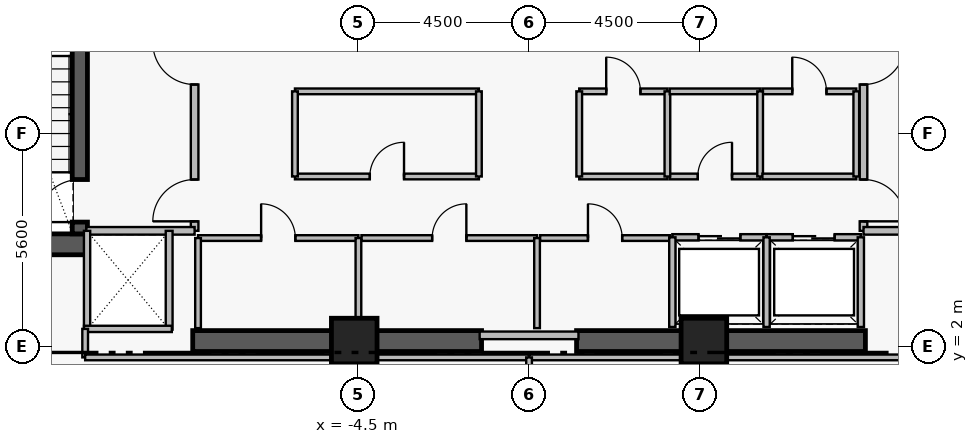
"""IFC4 building model, lengths in metres.
Left out: names, types, materials, properties, quantities, classifications, styles, units other than length and angle.
Written with IfcOpenShell. Run it as: python <this file> out.ifc"""

import sys

from ifc_helpers import new_model, si_unit, direction, frame, frame_2d, origin, origin_2d, place, context, subcontext, project, spatial, rectangle, extrude, element, fill, save


model = new_model("IFC4")
c1 = context("Model", 3, precision=1e-05, world=origin(), true_north=direction((0.0, 1.0)))
c2 = subcontext(c1, "Body", "Model", "MODEL_VIEW")
j1 = project(units=[si_unit("LENGTHUNIT", "METRE"), si_unit("PLANEANGLEUNIT", "RADIAN")], contexts=[c1])
p1 = place(None, origin())
s1 = spatial("IfcSite", under=j1, at=p1, CompositionType="ELEMENT")
p2 = place(p1, origin())
s2 = spatial("IfcBuilding", under=s1, at=p2, CompositionType="ELEMENT")
p3 = place(p2, frame((0.0, 0.0, 254.45)))
s3 = spatial("IfcBuildingStorey", under=s2, at=p3, CompositionType="ELEMENT", Elevation=254.45)
p4 = place(p3, frame((-15.96, 4.695, 0.0), z_axis=(0.0, 0.0, 1.0), x_axis=(1.0, 0.0, 0.0)))
e1 = element("IfcWall", 1, at=p4, inside=s3, PredefinedType="SHEAR", context=c2, shape_type="SweptSolid", body=[
    extrude(rectangle(XDim=4.36, YDim=0.55, at=frame_2d((2.18, 0.0))), origin(), (0.0, 0.0, 1.0), 3.51),
])
for number, where, z_axis, x_axis in (
    (2, (-8.85, 2.15, 0.0), (0.0, 0.0, 1.0), (1.0, 0.0, 0.0)),
    (3, (1.25, 2.15, 0.0), (0.0, 0.0, 1.0), (1.0, 0.0, 0.0)),
):
    element("IfcWall", number, at=place(p3, frame(where, z_axis=z_axis, x_axis=x_axis)), inside=s3, PredefinedType="SHEAR", context=c2, shape_type="SweptSolid", body=[
        extrude(rectangle(XDim=7.6, YDim=0.55, at=frame_2d((3.8, 0.0))), origin(), (0.0, 0.0, 1.0), 3.48),
    ])
p5 = place(p3, frame((-11.82, 4.97, 0.0), z_axis=(0.0, 0.0, 1.0), x_axis=(0.0, 1.0, 0.0)))
e4 = element("IfcWall", 4, at=p5, inside=s3, PredefinedType="SHEAR", context=c2, shape_type="SweptSolid", body=[
    extrude(rectangle(XDim=8.96, YDim=0.4, at=frame_2d((4.48, 0.0))), origin(), (0.0, 0.0, 1.0), 3.51),
])
p6 = place(p5, frame((0.31, 0.0, 0.0)))
e5 = element("IfcOpeningElement", 5, at=p6, cuts=e4, PredefinedType="OPENING", context=c2, shape_type="SweptSolid", body=[
    extrude(rectangle(XDim=1.12, YDim=2.22, at=frame_2d((0.56, 1.11))), frame((0.0, 0.21, 0.0), z_axis=(0.0, -1.0, 0.0), x_axis=(1.0, 0.0, 0.0)), (0.0, 0.0, 1.0), 0.42),
])
for number, where, z_axis, x_axis in (
    (6, (-4.6, 2.15, 0.0), (0.0, 0.0, 1.0), (1.0, 0.0, 0.0)),
    (7, (4.6, 2.15, 0.0), (0.0, 0.0, 1.0), (1.0, 0.0, 0.0)),
):
    element("IfcColumn", number, at=place(p3, frame(where, z_axis=z_axis, x_axis=x_axis)), inside=s3, PredefinedType="COLUMN", context=c2, shape_type="SweptSolid", body=[
        extrude(rectangle(XDim=1.2, YDim=1.2, at=origin_2d()), origin(), (0.0, 0.0, 1.0), 3.7),
    ])
p7 = place(p3, frame((-8.8, 5.05, 0.0), z_axis=(0.0, 0.0, 1.0), x_axis=(0.0, 1.0, 0.0)))
e8 = element("IfcWall", 8, at=p7, inside=s3, PredefinedType="PARTITIONING", context=c2, shape_type="SweptSolid", body=[
    extrude(rectangle(XDim=6.1, YDim=0.2, at=frame_2d((3.05, 0.0))), origin(), (0.0, 0.0, 1.0), 3.48),
])
p8 = place(p7, frame((0.25, 0.0, 0.0)))
e9 = element("IfcOpeningElement", 9, at=p8, cuts=e8, PredefinedType="OPENING", context=c2, shape_type="SweptSolid", body=[
    extrude(rectangle(XDim=1.1, YDim=2.2, at=frame_2d((0.55, 1.1))), frame((0.0, 0.11, 0.0), z_axis=(0.0, -1.0, 0.0), x_axis=(1.0, 0.0, 0.0)), (0.0, 0.0, 1.0), 0.22),
])
p9 = place(p7, frame((3.85, 0.0, 0.0)))
e10 = element("IfcOpeningElement", 10, at=p9, cuts=e8, PredefinedType="OPENING", context=c2, shape_type="SweptSolid", body=[
    extrude(rectangle(XDim=1.1, YDim=2.2, at=frame_2d((0.55, 1.1))), frame((0.0, 0.11, 0.0), z_axis=(0.0, -1.0, 0.0), x_axis=(1.0, 0.0, 0.0)), (0.0, 0.0, 1.0), 0.22),
])
p10 = place(p3, frame((8.8, 11.15, 0.0), z_axis=(0.0, 0.0, 1.0), x_axis=(0.0, -1.0, 0.0)))
e11 = element("IfcWall", 11, at=p10, inside=s3, PredefinedType="PARTITIONING", context=c2, shape_type="SweptSolid", body=[
    extrude(rectangle(XDim=6.1, YDim=0.2, at=frame_2d((3.05, 0.0))), origin(), (0.0, 0.0, 1.0), 3.48),
])
p11 = place(p10, frame((1.15, 0.0, 0.0)))
e12 = element("IfcOpeningElement", 12, at=p11, cuts=e11, PredefinedType="OPENING", context=c2, shape_type="SweptSolid", body=[
    extrude(rectangle(XDim=1.1, YDim=2.2, at=frame_2d((0.55, 1.1))), frame((0.0, 0.11, 0.0), z_axis=(0.0, -1.0, 0.0), x_axis=(1.0, 0.0, 0.0)), (0.0, 0.0, 1.0), 0.22),
])
p12 = place(p10, frame((4.75, 0.0, 0.0)))
e13 = element("IfcOpeningElement", 13, at=p12, cuts=e11, PredefinedType="OPENING", context=c2, shape_type="SweptSolid", body=[
    extrude(rectangle(XDim=1.1, YDim=2.2, at=frame_2d((0.55, 1.1))), frame((0.0, 0.11, 0.0), z_axis=(0.0, -1.0, 0.0), x_axis=(1.0, 0.0, 0.0)), (0.0, 0.0, 1.0), 0.22),
])
p13 = place(p3, frame((3.77, 4.88, 0.0), z_axis=(0.0, 0.0, 1.0), x_axis=(1.0, 0.0, 0.0)))
e14 = element("IfcWall", 14, at=p13, inside=s3, PredefinedType="PARTITIONING", context=c2, shape_type="SweptSolid", body=[
    extrude(rectangle(XDim=2.48, YDim=0.165, at=frame_2d((1.24, 0.0))), origin(), (0.0, 0.0, 1.0), 3.48),
])
p14 = place(p13, frame((0.69, 0.0, 0.0)))
e15 = element("IfcOpeningElement", 15, at=p14, cuts=e14, PredefinedType="OPENING", context=c2, shape_type="SweptSolid", body=[
    extrude(rectangle(XDim=1.1, YDim=2.25, at=frame_2d((0.55, 1.125))), frame((0.0, 0.093, 0.0), z_axis=(0.0, -1.0, 0.0), x_axis=(1.0, 0.0, 0.0)), (0.0, 0.0, 1.0), 0.185),
])
p15 = place(p3, frame((6.25, 4.88, 0.0), z_axis=(0.0, 0.0, 1.0), x_axis=(1.0, 0.0, 0.0)))
e16 = element("IfcWall", 16, at=p15, inside=s3, PredefinedType="PARTITIONING", context=c2, shape_type="SweptSolid", body=[
    extrude(rectangle(XDim=2.48, YDim=0.165, at=frame_2d((1.24, 0.0))), origin(), (0.0, 0.0, 1.0), 3.48),
])
p16 = place(p15, frame((0.69, 0.0, 0.0)))
e17 = element("IfcOpeningElement", 17, at=p16, cuts=e16, PredefinedType="OPENING", context=c2, shape_type="SweptSolid", body=[
    extrude(rectangle(XDim=1.1, YDim=2.25, at=frame_2d((0.55, 1.125))), frame((0.0, 0.093, 0.0), z_axis=(0.0, -1.0, 0.0), x_axis=(1.0, 0.0, 0.0)), (0.0, 0.0, 1.0), 0.185),
])
p17 = place(p3, frame((-8.71, 4.86, 0.0), z_axis=(0.0, 0.0, 1.0), x_axis=(1.0, 0.0, 0.0)))
e18 = element("IfcWall", 18, at=p17, inside=s3, PredefinedType="PARTITIONING", context=c2, shape_type="SweptSolid", body=[
    extrude(rectangle(XDim=4.22, YDim=0.15, at=frame_2d((2.11, 0.0))), origin(), (0.0, 0.0, 1.0), 3.48),
])
p18 = place(p17, frame((1.66, 0.0, 0.0)))
e19 = element("IfcOpeningElement", 19, at=p18, cuts=e18, PredefinedType="OPENING", context=c2, shape_type="SweptSolid", body=[
    extrude(rectangle(XDim=0.9, YDim=2.15, at=frame_2d((0.45, 1.075))), frame((0.0, 0.085, 0.0), z_axis=(0.0, -1.0, 0.0), x_axis=(1.0, 0.0, 0.0)), (0.0, 0.0, 1.0), 0.17),
])
p19 = place(p3, frame((-4.41, 4.86, 0.0), z_axis=(0.0, 0.0, 1.0), x_axis=(1.0, 0.0, 0.0)))
e20 = element("IfcWall", 20, at=p19, inside=s3, PredefinedType="PARTITIONING", context=c2, shape_type="SweptSolid", body=[
    extrude(rectangle(XDim=4.62, YDim=0.15, at=frame_2d((2.31, 0.0))), origin(), (0.0, 0.0, 1.0), 3.48),
])
p20 = place(p19, frame((1.86, 0.0, 0.0)))
e21 = element("IfcOpeningElement", 21, at=p20, cuts=e20, PredefinedType="OPENING", context=c2, shape_type="SweptSolid", body=[
    extrude(rectangle(XDim=0.9, YDim=2.15, at=frame_2d((0.45, 1.075))), frame((0.0, 0.085, 0.0), z_axis=(0.0, -1.0, 0.0), x_axis=(1.0, 0.0, 0.0)), (0.0, 0.0, 1.0), 0.17),
])
p21 = place(p3, frame((0.29, 4.86, 0.0), z_axis=(0.0, 0.0, 1.0), x_axis=(1.0, 0.0, 0.0)))
e22 = element("IfcWall", 22, at=p21, inside=s3, PredefinedType="PARTITIONING", context=c2, shape_type="SweptSolid", body=[
    extrude(rectangle(XDim=3.42, YDim=0.15, at=frame_2d((1.71, 0.0))), origin(), (0.0, 0.0, 1.0), 3.48),
])
p22 = place(p21, frame((1.26, 0.0, 0.0)))
e23 = element("IfcOpeningElement", 23, at=p22, cuts=e22, PredefinedType="OPENING", context=c2, shape_type="SweptSolid", body=[
    extrude(rectangle(XDim=0.9, YDim=2.15, at=frame_2d((0.45, 1.075))), frame((0.0, 0.085, 0.0), z_axis=(0.0, -1.0, 0.0), x_axis=(1.0, 0.0, 0.0)), (0.0, 0.0, 1.0), 0.17),
])
p23 = place(p3, frame((-6.16, 6.48, 0.0), z_axis=(0.0, 0.0, 1.0), x_axis=(1.0, 0.0, 0.0)))
e24 = element("IfcWall", 24, at=p23, inside=s3, PredefinedType="PARTITIONING", context=c2, shape_type="SweptSolid", body=[
    extrude(rectangle(XDim=4.84, YDim=0.15, at=frame_2d((2.42, 0.0))), origin(), (0.0, 0.0, 1.0), 3.48),
])
p24 = place(p23, frame((1.97, 0.0, 0.0)))
e25 = element("IfcOpeningElement", 25, at=p24, cuts=e24, PredefinedType="OPENING", context=c2, shape_type="SweptSolid", body=[
    extrude(rectangle(XDim=0.9, YDim=2.15, at=frame_2d((0.45, 1.075))), frame((0.0, 0.085, 0.0), z_axis=(0.0, -1.0, 0.0), x_axis=(1.0, 0.0, 0.0)), (0.0, 0.0, 1.0), 0.17),
])
p25 = place(p3, frame((1.32, 8.72, 0.0), z_axis=(0.0, 0.0, 1.0), x_axis=(1.0, 0.0, 0.0)))
e26 = element("IfcWall", 26, at=p25, inside=s3, PredefinedType="PARTITIONING", context=c2, shape_type="SweptSolid", body=[
    extrude(rectangle(XDim=2.32, YDim=0.15, at=frame_2d((1.16, 0.0))), origin(), (0.0, 0.0, 1.0), 3.48),
])
p26 = place(p25, frame((0.71, 0.0, 0.0)))
e27 = element("IfcOpeningElement", 27, at=p26, cuts=e26, PredefinedType="OPENING", context=c2, shape_type="SweptSolid", body=[
    extrude(rectangle(XDim=0.9, YDim=2.15, at=frame_2d((0.45, 1.075))), frame((0.0, 0.085, 0.0), z_axis=(0.0, -1.0, 0.0), x_axis=(1.0, 0.0, 0.0)), (0.0, 0.0, 1.0), 0.17),
])
p27 = place(p3, frame((3.7, 6.48, 0.0), z_axis=(0.0, 0.0, 1.0), x_axis=(1.0, 0.0, 0.0)))
e28 = element("IfcWall", 28, at=p27, inside=s3, PredefinedType="PARTITIONING", context=c2, shape_type="SweptSolid", body=[
    extrude(rectangle(XDim=2.38, YDim=0.15, at=frame_2d((1.19, 0.0))), origin(), (0.0, 0.0, 1.0), 3.48),
])
p28 = place(p27, frame((0.74, 0.0, 0.0)))
e29 = element("IfcOpeningElement", 29, at=p28, cuts=e28, PredefinedType="OPENING", context=c2, shape_type="SweptSolid", body=[
    extrude(rectangle(XDim=0.9, YDim=2.15, at=frame_2d((0.45, 1.075))), frame((0.0, 0.085, 0.0), z_axis=(0.0, -1.0, 0.0), x_axis=(1.0, 0.0, 0.0)), (0.0, 0.0, 1.0), 0.17),
])
p29 = place(p3, frame((6.14, 8.72, 0.0), z_axis=(0.0, 0.0, 1.0), x_axis=(1.0, 0.0, 0.0)))
e30 = element("IfcWall", 30, at=p29, inside=s3, PredefinedType="PARTITIONING", context=c2, shape_type="SweptSolid", body=[
    extrude(rectangle(XDim=2.47, YDim=0.15, at=frame_2d((1.235, 0.0))), origin(), (0.0, 0.0, 1.0), 3.48),
])
p30 = place(p29, frame((0.785, 0.0, 0.0)))
e31 = element("IfcOpeningElement", 31, at=p30, cuts=e30, PredefinedType="OPENING", context=c2, shape_type="SweptSolid", body=[
    extrude(rectangle(XDim=0.9, YDim=2.15, at=frame_2d((0.45, 1.075))), frame((0.0, 0.085, 0.0), z_axis=(0.0, -1.0, 0.0), x_axis=(1.0, 0.0, 0.0)), (0.0, 0.0, 1.0), 0.17),
])
for number, where, z_axis, x_axis in (
    (32, (-11.65, 5.05, 0.0), (0.0, 0.0, 1.0), (1.0, 0.0, 0.0)),
    (33, (8.8, 5.05, 0.0), (0.0, 0.0, 1.0), (1.0, 0.0, 0.0)),
):
    element("IfcWall", number, at=place(p3, frame(where, z_axis=z_axis, x_axis=x_axis)), inside=s3, PredefinedType="PARTITIONING", context=c2, shape_type="SweptSolid", body=[
        extrude(rectangle(XDim=2.85, YDim=0.2, at=frame_2d((1.425, 0.0))), origin(), (0.0, 0.0, 1.0), 3.48),
    ])
for number, where, z_axis, x_axis in (
    (34, (3.77, 2.52, 0.0), (0.0, 0.0, 1.0), (0.0, 1.0, 0.0)),
    (35, (6.25, 2.52, 0.0), (0.0, 0.0, 1.0), (0.0, 1.0, 0.0)),
    (36, (8.73, 2.52, 0.0), (0.0, 0.0, 1.0), (0.0, 1.0, 0.0)),
):
    element("IfcWall", number, at=place(p3, frame(where, z_axis=z_axis, x_axis=x_axis)), inside=s3, PredefinedType="PARTITIONING", context=c2, shape_type="SweptSolid", body=[
        extrude(rectangle(XDim=2.36, YDim=0.165, at=frame_2d((1.18, 0.0))), origin(), (0.0, 0.0, 1.0), 3.48),
    ])
p31 = place(p3, frame((-1.3, 2.3, 0.0), z_axis=(0.0, 0.0, 1.0), x_axis=(1.0, 0.0, 0.0)))
e37 = element("IfcWall", 37, at=p31, inside=s3, PredefinedType="PARTITIONING", context=c2, shape_type="SweptSolid", body=[
    extrude(rectangle(XDim=2.6, YDim=0.2, at=frame_2d((1.3, 0.0))), origin(), (0.0, 0.0, 1.0), 2.38),
])
for number, where, z_axis, x_axis in (
    (38, (-8.71, 2.49, 0.0), (0.0, 0.0, 1.0), (0.0, 1.0, 0.0)),
    (39, (-4.49, 2.49, 0.0), (0.0, 0.0, 1.0), (0.0, 1.0, 0.0)),
    (40, (0.21, 2.49, 0.0), (0.0, 0.0, 1.0), (0.0, 1.0, 0.0)),
):
    element("IfcWall", number, at=place(p3, frame(where, z_axis=z_axis, x_axis=x_axis)), inside=s3, PredefinedType="PARTITIONING", context=c2, shape_type="SweptSolid", body=[
        extrude(rectangle(XDim=2.37, YDim=0.15, at=frame_2d((1.185, 0.0))), origin(), (0.0, 0.0, 1.0), 3.48),
    ])
p32 = place(p3, frame((-9.47, 2.45, 0.0), z_axis=(0.0, 0.0, 1.0), x_axis=(0.0, 1.0, 0.0)))
e41 = element("IfcWall", 41, at=p32, inside=s3, PredefinedType="PARTITIONING", context=c2, shape_type="SweptSolid", body=[
    extrude(rectangle(XDim=2.6, YDim=0.18, at=frame_2d((1.3, 0.0))), origin(), (0.0, 0.0, 1.0), 3.48),
])
p33 = place(p3, frame((-11.63, 2.47, 0.0), z_axis=(0.0, 0.0, 1.0), x_axis=(0.0, 1.0, 0.0)))
e42 = element("IfcWall", 42, at=p33, inside=s3, PredefinedType="PARTITIONING", context=c2, shape_type="SweptSolid", body=[
    extrude(rectangle(XDim=2.58, YDim=0.165, at=frame_2d((1.29, 0.0))), origin(), (0.0, 0.0, 1.0), 3.48),
])
p34 = place(p3, frame((-11.71, 2.47, 0.0), z_axis=(0.0, 0.0, 1.0), x_axis=(1.0, 0.0, 0.0)))
e43 = element("IfcWall", 43, at=p34, inside=s3, PredefinedType="PARTITIONING", context=c2, shape_type="SweptSolid", body=[
    extrude(rectangle(XDim=2.31, YDim=0.165, at=frame_2d((1.155, 0.0))), origin(), (0.0, 0.0, 1.0), 2.38),
])
p35 = place(p3, frame((-6.16, 8.72, 0.0), z_axis=(0.0, 0.0, 1.0), x_axis=(1.0, 0.0, 0.0)))
e44 = element("IfcWall", 44, at=p35, inside=s3, PredefinedType="PARTITIONING", context=c2, shape_type="SweptSolid", body=[
    extrude(rectangle(XDim=4.84, YDim=0.15, at=frame_2d((2.42, 0.0))), origin(), (0.0, 0.0, 1.0), 3.48),
])
for number, where, z_axis, x_axis in (
    (45, (-6.16, 6.48, 0.0), (0.0, 0.0, 1.0), (0.0, 1.0, 0.0)),
    (46, (-1.32, 6.48, 0.0), (0.0, 0.0, 1.0), (0.0, 1.0, 0.0)),
):
    element("IfcWall", number, at=place(p3, frame(where, z_axis=z_axis, x_axis=x_axis)), inside=s3, PredefinedType="PARTITIONING", context=c2, shape_type="SweptSolid", body=[
        extrude(rectangle(XDim=2.24, YDim=0.15, at=frame_2d((1.12, 0.0))), origin(), (0.0, 0.0, 1.0), 3.48),
    ])
p36 = place(p3, frame((1.32, 6.48, 0.0), z_axis=(0.0, 0.0, 1.0), x_axis=(1.0, 0.0, 0.0)))
e47 = element("IfcWall", 47, at=p36, inside=s3, PredefinedType="PARTITIONING", context=c2, shape_type="SweptSolid", body=[
    extrude(rectangle(XDim=2.32, YDim=0.15, at=frame_2d((1.16, 0.0))), origin(), (0.0, 0.0, 1.0), 3.48),
])
for number, where, z_axis, x_axis in (
    (48, (1.32, 6.48, 0.0), (0.0, 0.0, 1.0), (0.0, 1.0, 0.0)),
    (49, (3.64, 6.48, 0.0), (0.0, 0.0, 1.0), (0.0, 1.0, 0.0)),
):
    element("IfcWall", number, at=place(p3, frame(where, z_axis=z_axis, x_axis=x_axis)), inside=s3, PredefinedType="PARTITIONING", context=c2, shape_type="SweptSolid", body=[
        extrude(rectangle(XDim=2.24, YDim=0.15, at=frame_2d((1.12, 0.0))), origin(), (0.0, 0.0, 1.0), 3.48),
    ])
p37 = place(p3, frame((3.7, 8.72, 0.0), z_axis=(0.0, 0.0, 1.0), x_axis=(1.0, 0.0, 0.0)))
e50 = element("IfcWall", 50, at=p37, inside=s3, PredefinedType="PARTITIONING", context=c2, shape_type="SweptSolid", body=[
    extrude(rectangle(XDim=2.38, YDim=0.15, at=frame_2d((1.19, 0.0))), origin(), (0.0, 0.0, 1.0), 3.48),
])
p38 = place(p3, frame((6.08, 6.48, 0.0), z_axis=(0.0, 0.0, 1.0), x_axis=(0.0, 1.0, 0.0)))
e51 = element("IfcWall", 51, at=p38, inside=s3, PredefinedType="PARTITIONING", context=c2, shape_type="SweptSolid", body=[
    extrude(rectangle(XDim=2.24, YDim=0.15, at=frame_2d((1.12, 0.0))), origin(), (0.0, 0.0, 1.0), 3.48),
])
p39 = place(p3, frame((6.14, 6.48, 0.0), z_axis=(0.0, 0.0, 1.0), x_axis=(1.0, 0.0, 0.0)))
e52 = element("IfcWall", 52, at=p39, inside=s3, PredefinedType="PARTITIONING", context=c2, shape_type="SweptSolid", body=[
    extrude(rectangle(XDim=2.47, YDim=0.15, at=frame_2d((1.235, 0.0))), origin(), (0.0, 0.0, 1.0), 3.48),
])
p40 = place(p3, frame((8.61, 6.48, 0.0), z_axis=(0.0, 0.0, 1.0), x_axis=(0.0, 1.0, 0.0)))
e53 = element("IfcWall", 53, at=p40, inside=s3, PredefinedType="PARTITIONING", context=c2, shape_type="SweptSolid", body=[
    extrude(rectangle(XDim=2.24, YDim=0.15, at=frame_2d((1.12, 0.0))), origin(), (0.0, 0.0, 1.0), 3.48),
])
p41 = place(p3, frame((-11.68, 1.72, 0.0), z_axis=(0.0, 0.0, 1.0), x_axis=(0.0, 1.0, 0.0)))
e54 = element("IfcWall", 54, at=p41, inside=s3, PredefinedType="PARTITIONING", context=c2, shape_type="SweptSolid", body=[
    extrude(rectangle(XDim=0.75, YDim=0.15, at=frame_2d((0.375, 0.0))), origin(), (0.0, 0.0, 1.0), 3.48),
])
for number, where, z_axis, x_axis in (
    (55, (-11.68, 1.72, 0.0), (0.0, 0.0, 1.0), (1.0, 0.0, 0.0)),
    (56, (0.0, 1.72, 0.0), (0.0, 0.0, 1.0), (1.0, 0.0, 0.0)),
):
    element("IfcWall", number, at=place(p3, frame(where, z_axis=z_axis, x_axis=x_axis)), inside=s3, PredefinedType="PARTITIONING", context=c2, shape_type="SweptSolid", body=[
        extrude(rectangle(XDim=11.68, YDim=0.15, at=frame_2d((5.84, 0.0))), origin(), (0.0, 0.0, 1.0), 2.38),
    ])
p42 = place(p3, frame((0.0, 0.06, 0.0), z_axis=(0.0, 0.0, 1.0), x_axis=(0.0, 1.0, 0.0)))
e57 = element("IfcWall", 57, at=p42, inside=s3, PredefinedType="PARTITIONING", context=c2, shape_type="SweptSolid", body=[
    extrude(rectangle(XDim=1.66, YDim=0.15, at=frame_2d((0.83, 0.0))), origin(), (0.0, 0.0, 1.0), 3.48),
])
p43 = place(p6, origin())
e58 = element("IfcDoor", 58, at=p43, inside=s3, OperationType="SINGLE_SWING_LEFT", PredefinedType="DOOR", context=c2, shape_type="SweptSolid", body=[
    extrude(rectangle(XDim=1.12, YDim=2.22, at=frame_2d((0.56, 1.11))), frame((0.0, 0.025, 0.0), z_axis=(0.0, -1.0, 0.0), x_axis=(1.0, 0.0, 0.0)), (0.0, 0.0, 1.0), 0.05),
])
fill(e5, e58)
p44 = place(p8, origin())
e59 = element("IfcDoor", 59, at=p44, inside=s3, OperationType="SINGLE_SWING_LEFT", PredefinedType="DOOR", context=c2, shape_type="SweptSolid", body=[
    extrude(rectangle(XDim=1.1, YDim=2.2, at=frame_2d((0.55, 1.1))), frame((0.0, 0.025, 0.0), z_axis=(0.0, -1.0, 0.0), x_axis=(1.0, 0.0, 0.0)), (0.0, 0.0, 1.0), 0.05),
])
fill(e9, e59)
p45 = place(p9, origin())
e60 = element("IfcDoor", 60, at=p45, inside=s3, OperationType="SINGLE_SWING_RIGHT", PredefinedType="DOOR", context=c2, shape_type="SweptSolid", body=[
    extrude(rectangle(XDim=1.1, YDim=2.2, at=frame_2d((0.55, 1.1))), frame((0.0, 0.025, 0.0), z_axis=(0.0, -1.0, 0.0), x_axis=(1.0, 0.0, 0.0)), (0.0, 0.0, 1.0), 0.05),
])
fill(e10, e60)
p46 = place(p11, origin())
e61 = element("IfcDoor", 61, at=p46, inside=s3, OperationType="SINGLE_SWING_LEFT", PredefinedType="DOOR", context=c2, shape_type="SweptSolid", body=[
    extrude(rectangle(XDim=1.1, YDim=2.2, at=frame_2d((0.55, 1.1))), frame((0.0, 0.025, 0.0), z_axis=(0.0, -1.0, 0.0), x_axis=(1.0, 0.0, 0.0)), (0.0, 0.0, 1.0), 0.05),
])
fill(e12, e61)
p47 = place(p12, origin())
e62 = element("IfcDoor", 62, at=p47, inside=s3, OperationType="SINGLE_SWING_RIGHT", PredefinedType="DOOR", context=c2, shape_type="SweptSolid", body=[
    extrude(rectangle(XDim=1.1, YDim=2.2, at=frame_2d((0.55, 1.1))), frame((0.0, 0.025, 0.0), z_axis=(0.0, -1.0, 0.0), x_axis=(1.0, 0.0, 0.0)), (0.0, 0.0, 1.0), 0.05),
])
fill(e13, e62)
p48 = place(p14, origin())
e63 = element("IfcDoor", 63, at=p48, inside=s3, OperationType="SLIDING_TO_LEFT", PredefinedType="DOOR", context=c2, shape_type="SweptSolid", body=[
    extrude(rectangle(XDim=1.1, YDim=2.25, at=frame_2d((0.55, 1.125))), frame((0.0, 0.025, 0.0), z_axis=(0.0, -1.0, 0.0), x_axis=(1.0, 0.0, 0.0)), (0.0, 0.0, 1.0), 0.05),
])
fill(e15, e63)
p49 = place(p16, origin())
e64 = element("IfcDoor", 64, at=p49, inside=s3, OperationType="SLIDING_TO_LEFT", PredefinedType="DOOR", context=c2, shape_type="SweptSolid", body=[
    extrude(rectangle(XDim=1.1, YDim=2.25, at=frame_2d((0.55, 1.125))), frame((0.0, 0.025, 0.0), z_axis=(0.0, -1.0, 0.0), x_axis=(1.0, 0.0, 0.0)), (0.0, 0.0, 1.0), 0.05),
])
fill(e17, e64)
p50 = place(p18, origin())
e65 = element("IfcDoor", 65, at=p50, inside=s3, OperationType="SINGLE_SWING_LEFT", PredefinedType="DOOR", context=c2, shape_type="SweptSolid", body=[
    extrude(rectangle(XDim=0.9, YDim=2.15, at=frame_2d((0.45, 1.075))), frame((0.0, 0.025, 0.0), z_axis=(0.0, -1.0, 0.0), x_axis=(1.0, 0.0, 0.0)), (0.0, 0.0, 1.0), 0.05),
])
fill(e19, e65)
p51 = place(p20, origin())
e66 = element("IfcDoor", 66, at=p51, inside=s3, OperationType="SINGLE_SWING_RIGHT", PredefinedType="DOOR", context=c2, shape_type="SweptSolid", body=[
    extrude(rectangle(XDim=0.9, YDim=2.15, at=frame_2d((0.45, 1.075))), frame((0.0, 0.025, 0.0), z_axis=(0.0, -1.0, 0.0), x_axis=(1.0, 0.0, 0.0)), (0.0, 0.0, 1.0), 0.05),
])
fill(e21, e66)
p52 = place(p22, origin())
e67 = element("IfcDoor", 67, at=p52, inside=s3, OperationType="SINGLE_SWING_LEFT", PredefinedType="DOOR", context=c2, shape_type="SweptSolid", body=[
    extrude(rectangle(XDim=0.9, YDim=2.15, at=frame_2d((0.45, 1.075))), frame((0.0, 0.025, 0.0), z_axis=(0.0, -1.0, 0.0), x_axis=(1.0, 0.0, 0.0)), (0.0, 0.0, 1.0), 0.05),
])
fill(e23, e67)
p53 = place(p24, origin())
e68 = element("IfcDoor", 68, at=p53, inside=s3, OperationType="SINGLE_SWING_RIGHT", PredefinedType="DOOR", context=c2, shape_type="SweptSolid", body=[
    extrude(rectangle(XDim=0.9, YDim=2.15, at=frame_2d((0.45, 1.075))), frame((0.0, 0.025, 0.0), z_axis=(0.0, -1.0, 0.0), x_axis=(1.0, 0.0, 0.0)), (0.0, 0.0, 1.0), 0.05),
])
fill(e25, e68)
p54 = place(p26, origin())
e69 = element("IfcDoor", 69, at=p54, inside=s3, OperationType="SINGLE_SWING_LEFT", PredefinedType="DOOR", context=c2, shape_type="SweptSolid", body=[
    extrude(rectangle(XDim=0.9, YDim=2.15, at=frame_2d((0.45, 1.075))), frame((0.0, 0.025, 0.0), z_axis=(0.0, -1.0, 0.0), x_axis=(1.0, 0.0, 0.0)), (0.0, 0.0, 1.0), 0.05),
])
fill(e27, e69)
p55 = place(p28, origin())
e70 = element("IfcDoor", 70, at=p55, inside=s3, OperationType="SINGLE_SWING_RIGHT", PredefinedType="DOOR", context=c2, shape_type="SweptSolid", body=[
    extrude(rectangle(XDim=0.9, YDim=2.15, at=frame_2d((0.45, 1.075))), frame((0.0, 0.025, 0.0), z_axis=(0.0, -1.0, 0.0), x_axis=(1.0, 0.0, 0.0)), (0.0, 0.0, 1.0), 0.05),
])
fill(e29, e70)
p56 = place(p30, origin())
e71 = element("IfcDoor", 71, at=p56, inside=s3, OperationType="SINGLE_SWING_LEFT", PredefinedType="DOOR", context=c2, shape_type="SweptSolid", body=[
    extrude(rectangle(XDim=0.9, YDim=2.15, at=frame_2d((0.45, 1.075))), frame((0.0, 0.025, 0.0), z_axis=(0.0, -1.0, 0.0), x_axis=(1.0, 0.0, 0.0)), (0.0, 0.0, 1.0), 0.05),
])
fill(e31, e71)
save(model, sys.argv[1])
